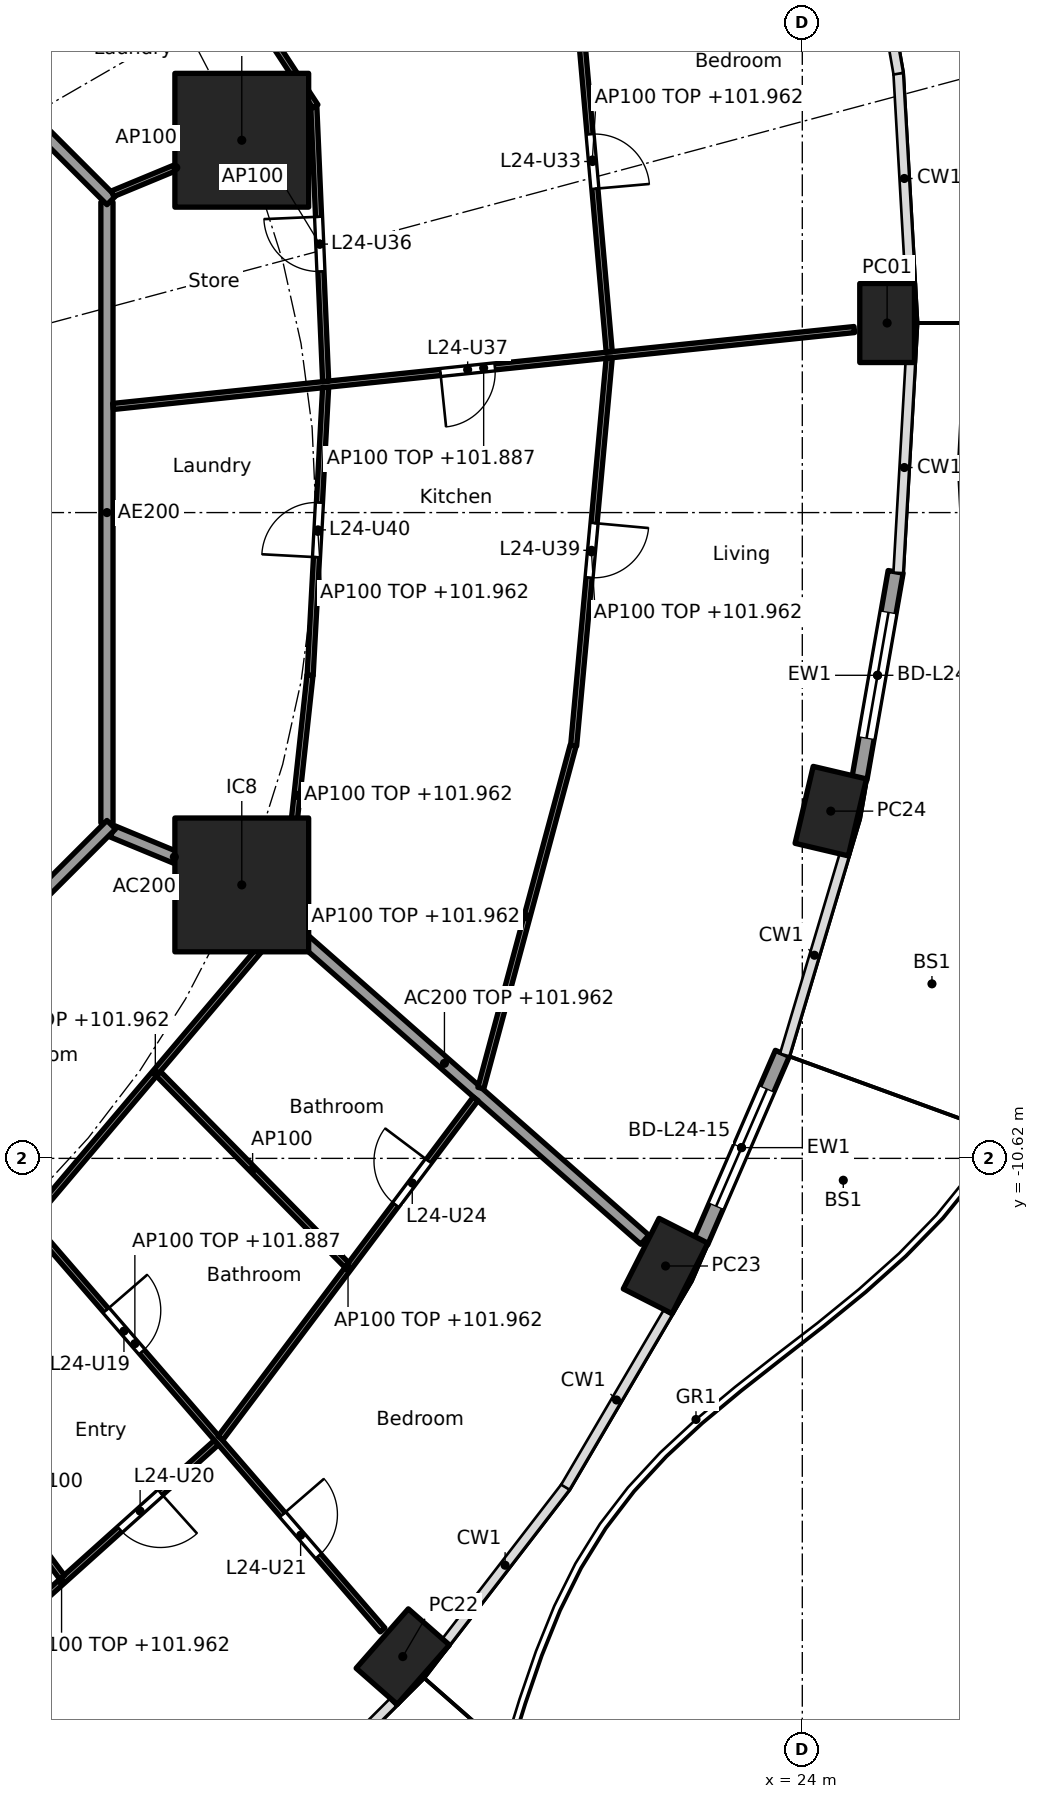
"""IFC4 building model, lengths in metres.
Left out: names, types, materials, properties, quantities, classifications, styles, units other than length and angle.
Written with IfcOpenShell. Run it as: python <this file> out.ifc"""

import sys

from ifc_helpers import new_model, si_unit, direction, frame, frame_2d, origin, origin_2d, place, context, subcontext, project, spatial, rectangle, hollow_rectangle, extrude, element, fill, save


model = new_model("IFC4")
c1 = context("Model", 3, precision=1e-05, world=origin(), true_north=direction((0.0, 1.0)))
c2 = subcontext(c1, "Body", "Model", "MODEL_VIEW")
j1 = project(units=[si_unit("LENGTHUNIT", "METRE"), si_unit("PLANEANGLEUNIT", "RADIAN")], contexts=[c1])
p1 = place(None, origin())
s1 = spatial("IfcSite", under=j1, at=p1, CompositionType="ELEMENT")
p2 = place(p1, origin())
s2 = spatial("IfcBuilding", under=s1, at=p2, CompositionType="ELEMENT")
p3 = place(p2, frame((0.0, 0.0, 99.2)))
s3 = spatial("IfcBuildingStorey", under=s2, at=p3, CompositionType="ELEMENT", Elevation=99.2)
for number, where, z_axis, x_axis in (
    (1, (25.395, 3.118, 0.0), (0.0, 0.0, 1.0), (0.0, 1.0, 0.0)),
    (2, (17.43, -18.813, 0.0), (0.0, 0.0, 1.0), (0.66, 0.751, 0.0)),
    (3, (21.751, -12.39, 0.0), (0.0, 0.0, 1.0), (0.452, 0.892, 0.0)),
    (4, (24.468, -4.91, 0.0), (0.0, 0.0, 1.0), (0.229, 0.973, 0.0)),
):
    element("IfcColumn", number, at=place(p3, frame(where, z_axis=z_axis, x_axis=x_axis)), inside=s3, PredefinedType="COLUMN", context=c2, shape_type="SweptSolid", body=[
        extrude(hollow_rectangle(XDim=1.3, YDim=0.9, WallThickness=0.045, at=origin_2d()), origin(), (0.0, 0.0, 1.0), 3.7),
    ])
for number, where, z_axis, x_axis in (
    (5, (14.782, 6.123, 0.0), (0.0, 0.0, 1.0), (1.0, 0.0, 0.0)),
    (6, (14.782, -6.123, 0.0), (0.0, 0.0, 1.0), (1.0, 0.0, 0.0)),
):
    element("IfcColumn", number, at=place(p3, frame(where, z_axis=z_axis, x_axis=x_axis)), inside=s3, PredefinedType="COLUMN", context=c2, shape_type="SweptSolid", body=[
        extrude(rectangle(XDim=2.2, YDim=2.2, at=origin_2d()), origin(), (0.0, 0.0, 1.0), 3.7),
    ])
p4 = place(p3, frame((23.672, -8.893, 0.0), z_axis=(0.0, 0.0, 1.0), x_axis=(-0.397621629246, -0.917549475481, 0.0)))
e7 = element("IfcWall", 7, at=p4, inside=s3, PredefinedType="SOLIDWALL", context=c2, shape_type="SweptSolid", body=[
    extrude(rectangle(XDim=3.379, YDim=0.25, at=frame_2d((1.69, 0.0))), origin(), (0.0, 0.0, 1.0), 3.44),
])
p5 = place(p4, frame((0.64, 0.0, 0.0)))
e8 = element("IfcOpeningElement", 8, at=p5, cuts=e7, PredefinedType="OPENING", context=c2, shape_type="SweptSolid", body=[
    extrude(rectangle(XDim=2.1, YDim=2.4, at=frame_2d((1.05, 1.2))), frame((0.0, 0.135, 0.0), z_axis=(0.0, -1.0, 0.0), x_axis=(1.0, 0.0, 0.0)), (0.0, 0.0, 1.0), 0.27),
])
p6 = place(p3, frame((25.535, -0.974, 0.0), z_axis=(0.0, 0.0, 1.0), x_axis=(-0.172164316671, -0.985068245385, 0.0)))
e9 = element("IfcWall", 9, at=p6, inside=s3, PredefinedType="SOLIDWALL", context=c2, shape_type="SweptSolid", body=[
    extrude(rectangle(XDim=3.454, YDim=0.25, at=frame_2d((1.727, 0.0))), origin(), (0.0, 0.0, 1.0), 3.44),
])
p7 = place(p6, frame((0.677, 0.0, 0.0)))
e10 = element("IfcOpeningElement", 10, at=p7, cuts=e9, PredefinedType="OPENING", context=c2, shape_type="SweptSolid", body=[
    extrude(rectangle(XDim=2.1, YDim=2.4, at=frame_2d((1.05, 1.2))), frame((0.0, 0.135, 0.0), z_axis=(0.0, -1.0, 0.0), x_axis=(1.0, 0.0, 0.0)), (0.0, 0.0, 1.0), 0.27),
])
p8 = place(p3, frame((12.657, -5.243, 0.0), z_axis=(0.0, 0.0, 1.0), x_axis=(0.923876145736, -0.382691608661, 0.0)))
e11 = element("IfcWall", 11, at=p8, inside=s3, PredefinedType="PARTITIONING", context=c2, shape_type="SweptSolid", body=[
    extrude(rectangle(XDim=2.2, YDim=0.2, at=frame_2d((1.1, 0.0))), origin(), (0.0, 0.0, 1.0), 3.44),
])
p9 = place(p3, frame((14.82, -6.156, 0.0), z_axis=(0.0, 0.0, 1.0), x_axis=(0.750582231659, -0.660777052808, 0.0)))
e12 = element("IfcWall", 12, at=p9, inside=s3, PredefinedType="PARTITIONING", context=c2, shape_type="SweptSolid", body=[
    extrude(rectangle(XDim=8.781, YDim=0.2, at=frame_2d((4.391, 0.0))), origin(), (0.0, 0.0, 1.0), 2.762),
])
p10 = place(p3, frame((12.565, -5.104, 0.0), z_axis=(0.0, 0.0, 1.0), x_axis=(0.0, 1.0, 0.0)))
e13 = element("IfcWall", 13, at=p10, inside=s3, PredefinedType="PARTITIONING", context=c2, shape_type="SweptSolid", body=[
    extrude(rectangle(XDim=10.209, YDim=0.2, at=frame_2d((5.104, 0.0))), origin(), (0.0, 0.0, 1.0), 3.44),
])
p11 = place(p3, frame((12.635, 5.134, 0.0), z_axis=(0.0, 0.0, 1.0), x_axis=(-0.707106781187, 0.707106781187, 0.0)))
e14 = element("IfcWall", 14, at=p11, inside=s3, PredefinedType="PARTITIONING", context=c2, shape_type="SweptSolid", body=[
    extrude(rectangle(XDim=10.609, YDim=0.2, at=frame_2d((5.305, 0.0))), origin(), (0.0, 0.0, 1.0), 3.44),
])
p12 = place(p11, frame((4.804, 0.0, 0.0)))
e15 = element("IfcOpeningElement", 15, at=p12, cuts=e14, PredefinedType="OPENING", context=c2, shape_type="SweptSolid", body=[
    extrude(rectangle(XDim=1.0, YDim=2.1, at=frame_2d((0.5, 1.05))), frame((0.0, 0.11, 0.0), z_axis=(0.0, -1.0, 0.0), x_axis=(1.0, 0.0, 0.0)), (0.0, 0.0, 1.0), 0.22),
])
p13 = place(p3, frame((5.275, -12.494, 0.0), z_axis=(0.0, 0.0, 1.0), x_axis=(0.707106781187, 0.707106781187, 0.0)))
e16 = element("IfcWall", 16, at=p13, inside=s3, PredefinedType="PARTITIONING", context=c2, shape_type="SweptSolid", body=[
    extrude(rectangle(XDim=10.409, YDim=0.2, at=frame_2d((5.205, 0.0))), origin(), (0.0, 0.0, 1.0), 3.44),
])
p14 = place(p13, frame((3.303, 0.0, 0.0)))
e17 = element("IfcOpeningElement", 17, at=p14, cuts=e16, PredefinedType="OPENING", context=c2, shape_type="SweptSolid", body=[
    extrude(rectangle(XDim=1.0, YDim=2.1, at=frame_2d((0.5, 1.05))), frame((0.0, 0.11, 0.0), z_axis=(0.0, -1.0, 0.0), x_axis=(1.0, 0.0, 0.0)), (0.0, 0.0, 1.0), 0.22),
])
p15 = place(p3, frame((12.664, 1.745, 0.0), z_axis=(0.0, 0.0, 1.0), x_axis=(0.994662790212, 0.103179134358, 0.0)))
e18 = element("IfcWall", 18, at=p15, inside=s3, PredefinedType="PARTITIONING", context=c2, shape_type="SweptSolid", body=[
    extrude(rectangle(XDim=12.257, YDim=0.1, at=frame_2d((6.128, 0.0))), origin(), (0.0, 0.0, 1.0), 2.687),
])
p16 = place(p15, frame((5.414, 0.0, 0.0)))
e19 = element("IfcOpeningElement", 19, at=p16, cuts=e18, PredefinedType="OPENING", context=c2, shape_type="SweptSolid", body=[
    extrude(rectangle(XDim=0.9, YDim=2.1, at=frame_2d((0.45, 1.05))), frame((0.0, 0.06, 0.0), z_axis=(0.0, -1.0, 0.0), x_axis=(1.0, 0.0, 0.0)), (0.0, 0.0, 1.0), 0.12),
])
p17 = place(p3, frame((16.162, 2.158, 0.0), z_axis=(0.0, 0.0, 1.0), x_axis=(-0.043120653248, 0.999069872063, 0.0)))
e20 = element("IfcWall", 20, at=p17, inside=s3, PredefinedType="PARTITIONING", context=c2, shape_type="SweptSolid", body=[
    extrude(rectangle(XDim=4.518, YDim=0.1, at=frame_2d((2.259, 0.0))), origin(), (0.0, 0.0, 1.0), 3.44),
])
p18 = place(p17, frame((1.809, 0.0, 0.0)))
e21 = element("IfcOpeningElement", 21, at=p18, cuts=e20, PredefinedType="OPENING", context=c2, shape_type="SweptSolid", body=[
    extrude(rectangle(XDim=0.9, YDim=2.1, at=frame_2d((0.45, 1.05))), frame((0.0, 0.06, 0.0), z_axis=(0.0, -1.0, 0.0), x_axis=(1.0, 0.0, 0.0)), (0.0, 0.0, 1.0), 0.12),
])
p19 = place(p3, frame((16.161, 2.058, 0.0), z_axis=(0.0, 0.0, 1.0), x_axis=(-0.053696394729, -0.998557307916, 0.0)))
e22 = element("IfcWall", 22, at=p19, inside=s3, PredefinedType="PARTITIONING", context=c2, shape_type="SweptSolid", body=[
    extrude(rectangle(XDim=4.742, YDim=0.1, at=frame_2d((2.371, 0.0))), origin(), (0.0, 0.0, 1.0), 2.762),
])
p20 = place(p19, frame((1.896, 0.0, 0.0)))
e23 = element("IfcOpeningElement", 23, at=p20, cuts=e22, PredefinedType="OPENING", context=c2, shape_type="SweptSolid", body=[
    extrude(rectangle(XDim=0.9, YDim=2.1, at=frame_2d((0.45, 1.05))), frame((0.0, 0.06, 0.0), z_axis=(0.0, -1.0, 0.0), x_axis=(1.0, 0.0, 0.0)), (0.0, 0.0, 1.0), 0.12),
])
p21 = place(p3, frame((20.825, 2.642, 0.0), z_axis=(0.0, 0.0, 1.0), x_axis=(-0.08776338161, 0.996141349834, 0.0)))
e24 = element("IfcWall", 24, at=p21, inside=s3, PredefinedType="PARTITIONING", context=c2, shape_type="SweptSolid", body=[
    extrude(rectangle(XDim=6.337, YDim=0.1, at=frame_2d((3.168, 0.0))), origin(), (0.0, 0.0, 1.0), 2.762),
])
p22 = place(p21, frame((2.694, 0.0, 0.0)))
e25 = element("IfcOpeningElement", 25, at=p22, cuts=e24, PredefinedType="OPENING", context=c2, shape_type="SweptSolid", body=[
    extrude(rectangle(XDim=0.9, YDim=2.1, at=frame_2d((0.45, 1.05))), frame((0.0, 0.06, 0.0), z_axis=(0.0, -1.0, 0.0), x_axis=(1.0, 0.0, 0.0)), (0.0, 0.0, 1.0), 0.12),
])
p23 = place(p3, frame((20.825, 2.542, 0.0), z_axis=(0.0, 0.0, 1.0), x_axis=(-0.09140211812, -0.995814065377, 0.0)))
e26 = element("IfcWall", 26, at=p23, inside=s3, PredefinedType="PARTITIONING", context=c2, shape_type="SweptSolid", body=[
    extrude(rectangle(XDim=6.403, YDim=0.1, at=frame_2d((3.201, 0.0))), origin(), (0.0, 0.0, 1.0), 2.762),
])
p24 = place(p23, frame((2.726, 0.0, 0.0)))
e27 = element("IfcOpeningElement", 27, at=p24, cuts=e26, PredefinedType="OPENING", context=c2, shape_type="SweptSolid", body=[
    extrude(rectangle(XDim=0.9, YDim=2.1, at=frame_2d((0.45, 1.05))), frame((0.0, 0.06, 0.0), z_axis=(0.0, -1.0, 0.0), x_axis=(1.0, 0.0, 0.0)), (0.0, 0.0, 1.0), 0.12),
])
p25 = place(p3, frame((12.657, 5.243, 0.0), z_axis=(0.0, 0.0, 1.0), x_axis=(0.923864733477, 0.382719158442, 0.0)))
e28 = element("IfcWall", 28, at=p25, inside=s3, PredefinedType="PARTITIONING", context=c2, shape_type="SweptSolid", body=[
    extrude(rectangle(XDim=2.25, YDim=0.1, at=frame_2d((1.125, 0.0))), origin(), (0.0, 0.0, 1.0), 3.44),
])
p26 = place(p3, frame((15.992, 6.68, 0.0), z_axis=(0.0, 0.0, 1.0), x_axis=(-0.547472878942, 0.836823426311, 0.0)))
e29 = element("IfcWall", 29, at=p26, inside=s3, PredefinedType="PARTITIONING", context=c2, shape_type="SweptSolid", body=[
    extrude(rectangle(XDim=4.738, YDim=0.1, at=frame_2d((2.369, 0.0))), origin(), (0.0, 0.0, 1.0), 2.762),
])
p27 = place(p3, frame((9.272, -19.868, 0.0), z_axis=(0.0, 0.0, 1.0), x_axis=(0.743884413566, 0.668308296562, 0.0)))
e30 = element("IfcWall", 30, at=p27, inside=s3, PredefinedType="PARTITIONING", context=c2, shape_type="SweptSolid", body=[
    extrude(rectangle(XDim=6.845, YDim=0.1, at=frame_2d((3.423, 0.0))), origin(), (0.0, 0.0, 1.0), 2.762),
])
p28 = place(p27, frame((4.709, 0.0, 0.0)))
e31 = element("IfcOpeningElement", 31, at=p28, cuts=e30, PredefinedType="OPENING", context=c2, shape_type="SweptSolid", body=[
    extrude(rectangle(XDim=0.9, YDim=2.1, at=frame_2d((0.45, 1.05))), frame((0.0, 0.06, 0.0), z_axis=(0.0, -1.0, 0.0), x_axis=(1.0, 0.0, 0.0)), (0.0, 0.0, 1.0), 0.12),
])
p29 = place(p3, frame((9.008, -13.708, 0.0), z_axis=(0.0, 0.0, 1.0), x_axis=(0.595845850207, -0.803098825047, 0.0)))
e32 = element("IfcWall", 32, at=p29, inside=s3, PredefinedType="PARTITIONING", context=c2, shape_type="SweptSolid", body=[
    extrude(rectangle(XDim=4.729, YDim=0.1, at=frame_2d((2.365, 0.0))), origin(), (0.0, 0.0, 1.0), 3.44),
])
p30 = place(p29, frame((1.94, 0.0, 0.0)))
e33 = element("IfcOpeningElement", 33, at=p30, cuts=e32, PredefinedType="OPENING", context=c2, shape_type="SweptSolid", body=[
    extrude(rectangle(XDim=0.9, YDim=2.1, at=frame_2d((0.45, 1.05))), frame((0.0, 0.06, 0.0), z_axis=(0.0, -1.0, 0.0), x_axis=(1.0, 0.0, 0.0)), (0.0, 0.0, 1.0), 0.12),
])
p31 = place(p3, frame((8.95, -8.96, 0.0), z_axis=(0.0, 0.0, 1.0), x_axis=(0.65441081073, -0.756139200676, 0.0)))
e34 = element("IfcWall", 34, at=p31, inside=s3, PredefinedType="PARTITIONING", context=c2, shape_type="SweptSolid", body=[
    extrude(rectangle(XDim=12.451, YDim=0.1, at=frame_2d((6.226, 0.0))), origin(), (0.0, 0.0, 1.0), 2.687),
])
p32 = place(p31, frame((1.336, 0.0, 0.0)))
e35 = element("IfcOpeningElement", 35, at=p32, cuts=e34, PredefinedType="OPENING", context=c2, shape_type="SweptSolid", body=[
    extrude(rectangle(XDim=0.9, YDim=2.1, at=frame_2d((0.45, 1.05))), frame((0.0, 0.06, 0.0), z_axis=(0.0, -1.0, 0.0), x_axis=(1.0, 0.0, 0.0)), (0.0, 0.0, 1.0), 0.12),
])
p33 = place(p31, frame((5.501, 0.0, 0.0)))
e36 = element("IfcOpeningElement", 36, at=p33, cuts=e34, PredefinedType="OPENING", context=c2, shape_type="SweptSolid", body=[
    extrude(rectangle(XDim=0.9, YDim=2.1, at=frame_2d((0.45, 1.05))), frame((0.0, 0.06, 0.0), z_axis=(0.0, -1.0, 0.0), x_axis=(1.0, 0.0, 0.0)), (0.0, 0.0, 1.0), 0.12),
])
p34 = place(p31, frame((9.941, 0.0, 0.0)))
e37 = element("IfcOpeningElement", 37, at=p34, cuts=e34, PredefinedType="OPENING", context=c2, shape_type="SweptSolid", body=[
    extrude(rectangle(XDim=0.9, YDim=2.1, at=frame_2d((0.45, 1.05))), frame((0.0, 0.06, 0.0), z_axis=(0.0, -1.0, 0.0), x_axis=(1.0, 0.0, 0.0)), (0.0, 0.0, 1.0), 0.12),
])
p35 = place(p3, frame((11.32, -11.623, 0.0), z_axis=(0.0, 0.0, 1.0), x_axis=(0.646106810963, 0.763247003811, 0.0)))
e38 = element("IfcWall", 38, at=p35, inside=s3, PredefinedType="PARTITIONING", context=c2, shape_type="SweptSolid", body=[
    extrude(rectangle(XDim=6.317, YDim=0.1, at=frame_2d((3.159, 0.0))), origin(), (0.0, 0.0, 1.0), 2.762),
])
p36 = place(p3, frame((14.432, -15.219, 0.0), z_axis=(0.0, 0.0, 1.0), x_axis=(0.601001256685, 0.799248077548, 0.0)))
e39 = element("IfcWall", 39, at=p36, inside=s3, PredefinedType="PARTITIONING", context=c2, shape_type="SweptSolid", body=[
    extrude(rectangle(XDim=6.98, YDim=0.1, at=frame_2d((3.49, 0.0))), origin(), (0.0, 0.0, 1.0), 2.762),
])
p37 = place(p36, frame((4.798, 0.0, 0.0)))
e40 = element("IfcOpeningElement", 40, at=p37, cuts=e39, PredefinedType="OPENING", context=c2, shape_type="SweptSolid", body=[
    extrude(rectangle(XDim=0.9, YDim=2.1, at=frame_2d((0.45, 1.05))), frame((0.0, 0.06, 0.0), z_axis=(0.0, -1.0, 0.0), x_axis=(1.0, 0.0, 0.0)), (0.0, 0.0, 1.0), 0.12),
])
p38 = place(p3, frame((13.412, -9.229, 0.0), z_axis=(0.0, 0.0, 1.0), x_axis=(0.701611164285, -0.712560014421, 0.0)))
e41 = element("IfcWall", 41, at=p38, inside=s3, PredefinedType="PARTITIONING", context=c2, shape_type="SweptSolid", body=[
    extrude(rectangle(XDim=4.415, YDim=0.1, at=frame_2d((2.208, 0.0))), origin(), (0.0, 0.0, 1.0), 3.44),
])
p39 = place(p3, frame((15.477, -6.625, 0.0), z_axis=(0.0, 0.0, 1.0), x_axis=(0.107570517496, 0.994197457131, 0.0)))
e42 = element("IfcWall", 42, at=p39, inside=s3, PredefinedType="PARTITIONING", context=c2, shape_type="SweptSolid", body=[
    extrude(rectangle(XDim=3.972, YDim=0.1, at=frame_2d((1.986, 0.0))), origin(), (0.0, 0.0, 1.0), 2.762),
])
p40 = place(p3, frame((18.713, -9.464, 0.0), z_axis=(0.0, 0.0, 1.0), x_axis=(0.260279646259, 0.965533275316, 0.0)))
e43 = element("IfcWall", 43, at=p40, inside=s3, PredefinedType="PARTITIONING", context=c2, shape_type="SweptSolid", body=[
    extrude(rectangle(XDim=5.833, YDim=0.1, at=frame_2d((2.917, 0.0))), origin(), (0.0, 0.0, 1.0), 2.762),
])
p41 = place(p5, origin())
e44 = element("IfcDoor", 44, at=p41, inside=s3, OperationType="SLIDING_TO_LEFT", PredefinedType="DOOR", context=c2, shape_type="SweptSolid", body=[
    extrude(rectangle(XDim=2.1, YDim=2.4, at=frame_2d((1.05, 1.2))), frame((0.0, 0.025, 0.0), z_axis=(0.0, -1.0, 0.0), x_axis=(1.0, 0.0, 0.0)), (0.0, 0.0, 1.0), 0.05),
])
fill(e8, e44)
p42 = place(p7, origin())
e45 = element("IfcDoor", 45, at=p42, inside=s3, OperationType="SLIDING_TO_LEFT", PredefinedType="DOOR", context=c2, shape_type="SweptSolid", body=[
    extrude(rectangle(XDim=2.1, YDim=2.4, at=frame_2d((1.05, 1.2))), frame((0.0, 0.025, 0.0), z_axis=(0.0, -1.0, 0.0), x_axis=(1.0, 0.0, 0.0)), (0.0, 0.0, 1.0), 0.05),
])
fill(e10, e45)
p43 = place(p33, origin())
e46 = element("IfcDoor", 46, at=p43, inside=s3, OperationType="SINGLE_SWING_LEFT", PredefinedType="DOOR", context=c2, shape_type="SweptSolid", body=[
    extrude(rectangle(XDim=0.9, YDim=2.1, at=frame_2d((0.45, 1.05))), frame((0.0, 0.025, 0.0), z_axis=(0.0, -1.0, 0.0), x_axis=(1.0, 0.0, 0.0)), (0.0, 0.0, 1.0), 0.05),
])
fill(e36, e46)
p44 = place(p28, frame((0.9, 0.0, 0.0), x_axis=(-1.0, 0.0, 0.0)))
e47 = element("IfcDoor", 47, at=p44, inside=s3, OperationType="SINGLE_SWING_LEFT", PredefinedType="DOOR", context=c2, shape_type="SweptSolid", body=[
    extrude(rectangle(XDim=0.9, YDim=2.1, at=frame_2d((0.45, 1.05))), frame((0.0, 0.025, 0.0), z_axis=(0.0, -1.0, 0.0), x_axis=(1.0, 0.0, 0.0)), (0.0, 0.0, 1.0), 0.05),
])
fill(e31, e47)
p45 = place(p34, origin())
e48 = element("IfcDoor", 48, at=p45, inside=s3, OperationType="SINGLE_SWING_LEFT", PredefinedType="DOOR", context=c2, shape_type="SweptSolid", body=[
    extrude(rectangle(XDim=0.9, YDim=2.1, at=frame_2d((0.45, 1.05))), frame((0.0, 0.025, 0.0), z_axis=(0.0, -1.0, 0.0), x_axis=(1.0, 0.0, 0.0)), (0.0, 0.0, 1.0), 0.05),
])
fill(e37, e48)
p46 = place(p37, origin())
e49 = element("IfcDoor", 49, at=p46, inside=s3, OperationType="SINGLE_SWING_RIGHT", PredefinedType="DOOR", context=c2, shape_type="SweptSolid", body=[
    extrude(rectangle(XDim=0.9, YDim=2.1, at=frame_2d((0.45, 1.05))), frame((0.0, 0.025, 0.0), z_axis=(0.0, -1.0, 0.0), x_axis=(1.0, 0.0, 0.0)), (0.0, 0.0, 1.0), 0.05),
])
fill(e40, e49)
p47 = place(p22, frame((0.9, 0.0, 0.0), x_axis=(-1.0, 0.0, 0.0)))
e50 = element("IfcDoor", 50, at=p47, inside=s3, OperationType="SINGLE_SWING_RIGHT", PredefinedType="DOOR", context=c2, shape_type="SweptSolid", body=[
    extrude(rectangle(XDim=0.9, YDim=2.1, at=frame_2d((0.45, 1.05))), frame((0.0, 0.025, 0.0), z_axis=(0.0, -1.0, 0.0), x_axis=(1.0, 0.0, 0.0)), (0.0, 0.0, 1.0), 0.05),
])
fill(e25, e50)
p48 = place(p18, origin())
e51 = element("IfcDoor", 51, at=p48, inside=s3, OperationType="SINGLE_SWING_RIGHT", PredefinedType="DOOR", context=c2, shape_type="SweptSolid", body=[
    extrude(rectangle(XDim=0.9, YDim=2.1, at=frame_2d((0.45, 1.05))), frame((0.0, 0.025, 0.0), z_axis=(0.0, -1.0, 0.0), x_axis=(1.0, 0.0, 0.0)), (0.0, 0.0, 1.0), 0.05),
])
fill(e21, e51)
p49 = place(p16, frame((0.9, 0.0, 0.0), x_axis=(-1.0, 0.0, 0.0)))
e52 = element("IfcDoor", 52, at=p49, inside=s3, OperationType="SINGLE_SWING_RIGHT", PredefinedType="DOOR", context=c2, shape_type="SweptSolid", body=[
    extrude(rectangle(XDim=0.9, YDim=2.1, at=frame_2d((0.45, 1.05))), frame((0.0, 0.025, 0.0), z_axis=(0.0, -1.0, 0.0), x_axis=(1.0, 0.0, 0.0)), (0.0, 0.0, 1.0), 0.05),
])
fill(e19, e52)
p50 = place(p24, origin())
e53 = element("IfcDoor", 53, at=p50, inside=s3, OperationType="SINGLE_SWING_LEFT", PredefinedType="DOOR", context=c2, shape_type="SweptSolid", body=[
    extrude(rectangle(XDim=0.9, YDim=2.1, at=frame_2d((0.45, 1.05))), frame((0.0, 0.025, 0.0), z_axis=(0.0, -1.0, 0.0), x_axis=(1.0, 0.0, 0.0)), (0.0, 0.0, 1.0), 0.05),
])
fill(e27, e53)
p51 = place(p20, frame((0.9, 0.0, 0.0), x_axis=(-1.0, 0.0, 0.0)))
e54 = element("IfcDoor", 54, at=p51, inside=s3, OperationType="SINGLE_SWING_LEFT", PredefinedType="DOOR", context=c2, shape_type="SweptSolid", body=[
    extrude(rectangle(XDim=0.9, YDim=2.1, at=frame_2d((0.45, 1.05))), frame((0.0, 0.025, 0.0), z_axis=(0.0, -1.0, 0.0), x_axis=(1.0, 0.0, 0.0)), (0.0, 0.0, 1.0), 0.05),
])
fill(e23, e54)
save(model, sys.argv[1])
